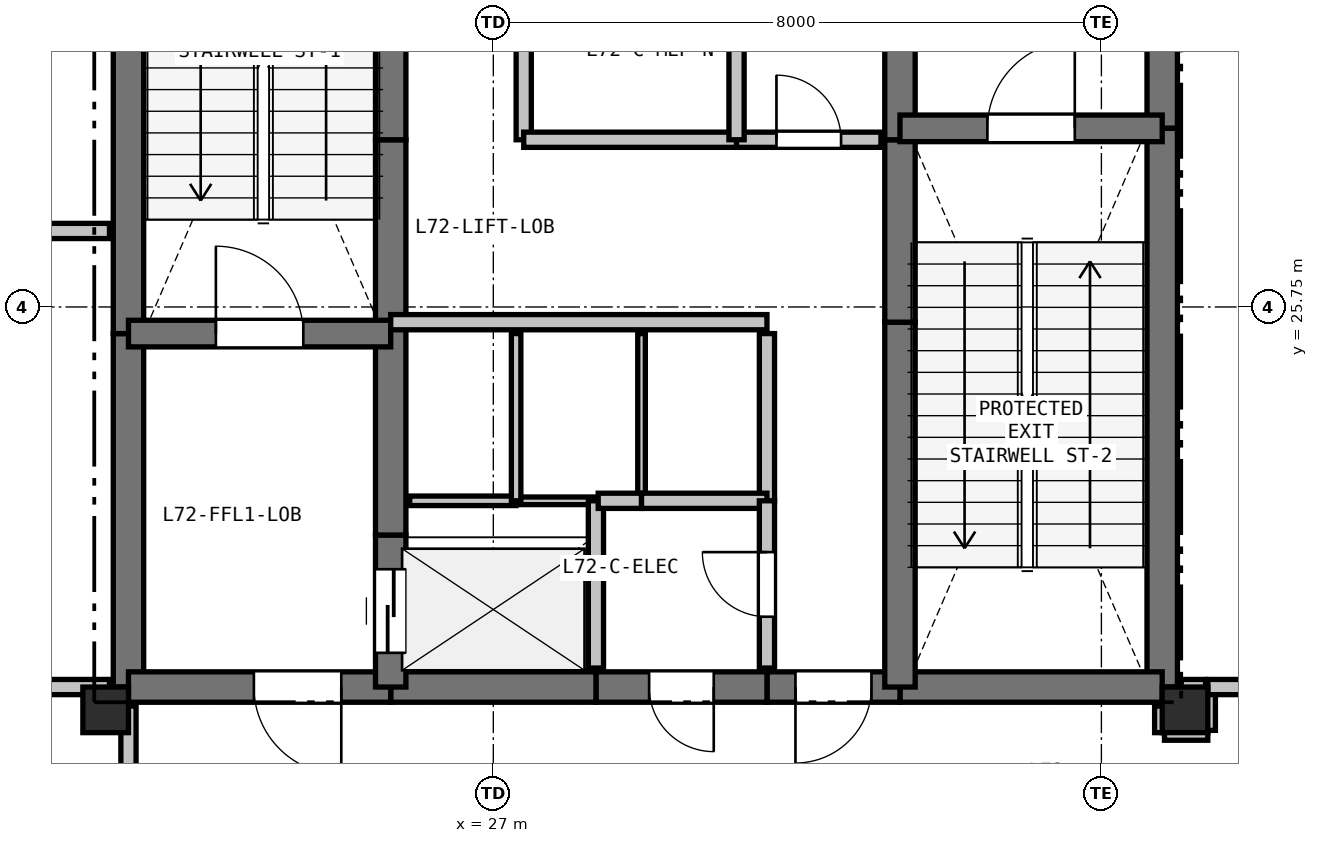
"""IFC4 building model, lengths in metres.
Left out: names, types, materials, properties, quantities, classifications, styles, units other than length and angle.
Written with IfcOpenShell. Run it as: python <this file> out.ifc"""

import sys

from ifc_helpers import new_model, si_unit, direction, frame, frame_2d, origin, origin_2d, place, context, subcontext, project, spatial, rectangle, extrude, element, fill, save


model = new_model("IFC4")
c1 = context("Model", 3, precision=1e-05, world=origin(), true_north=direction((0.0, 1.0)))
c2 = subcontext(c1, "Body", "Model", "MODEL_VIEW")
j1 = project(units=[si_unit("LENGTHUNIT", "METRE"), si_unit("PLANEANGLEUNIT", "RADIAN")], contexts=[c1])
p1 = place(None, origin())
s1 = spatial("IfcSite", under=j1, at=p1, CompositionType="ELEMENT")
p2 = place(p1, origin())
s2 = spatial("IfcBuilding", under=s1, at=p2, CompositionType="ELEMENT")
p3 = place(p2, frame((0.0, 0.0, 258.6)))
s3 = spatial("IfcBuildingStorey", under=s2, at=p3, CompositionType="ELEMENT", Elevation=258.6)
for number, where, z_axis, x_axis in (
    (1, (21.9, 20.45, 0.0), (0.0, 0.0, 1.0), (1.0, 0.0, 0.0)),
    (2, (36.1, 20.45, 0.0), (0.0, 0.0, 1.0), (1.0, 0.0, 0.0)),
):
    element("IfcColumn", number, at=place(p3, frame(where, z_axis=z_axis, x_axis=x_axis)), inside=s3, PredefinedType="COLUMN", context=c2, shape_type="SweptSolid", body=[
        extrude(rectangle(XDim=0.6, YDim=0.6, at=origin_2d()), origin(), (0.0, 0.0, 1.0), 5.4),
    ])
p4 = place(p3, frame((22.2, 20.75, 0.0), z_axis=(0.0, 0.0, 1.0), x_axis=(0.0, 1.0, 0.0)))
e3 = element("IfcWall", 3, at=p4, inside=s3, PredefinedType="SHEAR", context=c2, shape_type="SweptSolid", body=[
    extrude(rectangle(XDim=4.65, YDim=0.4, at=frame_2d((2.325, 0.0))), origin(), (0.0, 0.0, 1.0), 5.08),
])
p5 = place(p3, frame((22.2, 25.4, 0.0), z_axis=(0.0, 0.0, 1.0), x_axis=(0.0, 1.0, 0.0)))
e4 = element("IfcWall", 4, at=p5, inside=s3, PredefinedType="SHEAR", context=c2, shape_type="SweptSolid", body=[
    extrude(rectangle(XDim=7.35, YDim=0.4, at=frame_2d((3.675, 0.0))), origin(), (0.0, 0.0, 1.0), 5.08),
])
p6 = place(p3, frame((35.8, 32.75, 0.0), z_axis=(0.0, 0.0, 1.0), x_axis=(0.0, -1.0, 0.0)))
e5 = element("IfcWall", 5, at=p6, inside=s3, PredefinedType="SHEAR", context=c2, shape_type="SweptSolid", body=[
    extrude(rectangle(XDim=4.65, YDim=0.4, at=frame_2d((2.325, 0.0))), origin(), (0.0, 0.0, 1.0), 5.08),
])
p7 = place(p3, frame((35.8, 28.1, 0.0), z_axis=(0.0, 0.0, 1.0), x_axis=(0.0, -1.0, 0.0)))
e6 = element("IfcWall", 6, at=p7, inside=s3, PredefinedType="SHEAR", context=c2, shape_type="SweptSolid", body=[
    extrude(rectangle(XDim=7.35, YDim=0.4, at=frame_2d((3.675, 0.0))), origin(), (0.0, 0.0, 1.0), 5.08),
])
p8 = place(p3, frame((35.8, 20.75, 0.0), z_axis=(0.0, 0.0, 1.0), x_axis=(-1.0, 0.0, 0.0)))
e7 = element("IfcWall", 7, at=p8, inside=s3, PredefinedType="SHEAR", context=c2, shape_type="SweptSolid", body=[
    extrude(rectangle(XDim=3.45, YDim=0.4, at=frame_2d((1.725, 0.0))), origin(), (0.0, 0.0, 1.0), 5.08),
])
p9 = place(p3, frame((32.35, 20.75, 0.0), z_axis=(0.0, 0.0, 1.0), x_axis=(-1.0, 0.0, 0.0)))
e8 = element("IfcWall", 8, at=p9, inside=s3, PredefinedType="SHEAR", context=c2, shape_type="SweptSolid", body=[
    extrude(rectangle(XDim=1.75, YDim=0.4, at=frame_2d((0.875, 0.0))), origin(), (0.0, 0.0, 1.0), 5.08),
])
p10 = place(p9, frame((0.375, 0.0, 0.0)))
e9 = element("IfcOpeningElement", 9, at=p10, cuts=e8, PredefinedType="OPENING", context=c2, shape_type="SweptSolid", body=[
    extrude(rectangle(XDim=1.0, YDim=2.15, at=frame_2d((0.5, 1.075))), frame((0.0, 0.21, 0.0), z_axis=(0.0, -1.0, 0.0), x_axis=(1.0, 0.0, 0.0)), (0.0, 0.0, 1.0), 0.42),
])
p11 = place(p3, frame((30.6, 20.75, 0.0), z_axis=(0.0, 0.0, 1.0), x_axis=(-1.0, 0.0, 0.0)))
e10 = element("IfcWall", 10, at=p11, inside=s3, PredefinedType="SHEAR", context=c2, shape_type="SweptSolid", body=[
    extrude(rectangle(XDim=2.25, YDim=0.4, at=frame_2d((1.125, 0.0))), origin(), (0.0, 0.0, 1.0), 5.08),
])
p12 = place(p11, frame((0.7, 0.0, 0.0)))
e11 = element("IfcOpeningElement", 11, at=p12, cuts=e10, PredefinedType="OPENING", context=c2, shape_type="SweptSolid", body=[
    extrude(rectangle(XDim=0.85, YDim=2.1, at=frame_2d((0.425, 1.05))), frame((0.0, 0.21, 0.0), z_axis=(0.0, -1.0, 0.0), x_axis=(1.0, 0.0, 0.0)), (0.0, 0.0, 1.0), 0.42),
])
p13 = place(p3, frame((28.35, 20.75, 0.0), z_axis=(0.0, 0.0, 1.0), x_axis=(-1.0, 0.0, 0.0)))
e12 = element("IfcWall", 12, at=p13, inside=s3, PredefinedType="SHEAR", context=c2, shape_type="SweptSolid", body=[
    extrude(rectangle(XDim=2.7, YDim=0.4, at=frame_2d((1.35, 0.0))), origin(), (0.0, 0.0, 1.0), 5.08),
])
p14 = place(p3, frame((25.65, 20.75, 0.0), z_axis=(0.0, 0.0, 1.0), x_axis=(-1.0, 0.0, 0.0)))
e13 = element("IfcWall", 13, at=p14, inside=s3, PredefinedType="SHEAR", context=c2, shape_type="SweptSolid", body=[
    extrude(rectangle(XDim=3.45, YDim=0.4, at=frame_2d((1.725, 0.0))), origin(), (0.0, 0.0, 1.0), 5.08),
])
p15 = place(p14, frame((0.65, 0.0, 0.0)))
e14 = element("IfcOpeningElement", 14, at=p15, cuts=e13, PredefinedType="OPENING", context=c2, shape_type="SweptSolid", body=[
    extrude(rectangle(XDim=1.15, YDim=2.15, at=frame_2d((0.575, 1.075))), frame((0.0, 0.21, 0.0), z_axis=(0.0, -1.0, 0.0), x_axis=(1.0, 0.0, 0.0)), (0.0, 0.0, 1.0), 0.42),
])
p16 = place(p3, frame((25.65, 20.75, 0.0), z_axis=(0.0, 0.0, 1.0), x_axis=(0.0, 1.0, 0.0)))
e15 = element("IfcWall", 15, at=p16, inside=s3, PredefinedType="SHEAR", context=c2, shape_type="SweptSolid", body=[
    extrude(rectangle(XDim=2.0, YDim=0.4, at=frame_2d((1.0, 0.0))), origin(), (0.0, 0.0, 1.0), 5.08),
])
p17 = place(p16, frame((0.45, 0.0, 0.0)))
e16 = element("IfcOpeningElement", 16, at=p17, cuts=e15, PredefinedType="OPENING", context=c2, shape_type="SweptSolid", body=[
    extrude(rectangle(XDim=1.1, YDim=2.15, at=frame_2d((0.55, 1.075))), frame((0.0, 0.21, 0.0), z_axis=(0.0, -1.0, 0.0), x_axis=(1.0, 0.0, 0.0)), (0.0, 0.0, 1.0), 0.42),
])
p18 = place(p3, frame((25.65, 22.75, 0.0), z_axis=(0.0, 0.0, 1.0), x_axis=(0.0, 1.0, 0.0)))
e17 = element("IfcWall", 17, at=p18, inside=s3, PredefinedType="SHEAR", context=c2, shape_type="SweptSolid", body=[
    extrude(rectangle(XDim=2.8, YDim=0.4, at=frame_2d((1.4, 0.0))), origin(), (0.0, 0.0, 1.0), 5.08),
])
p19 = place(p3, frame((25.65, 25.55, 0.0), z_axis=(0.0, 0.0, 1.0), x_axis=(0.0, 1.0, 0.0)))
e18 = element("IfcWall", 18, at=p19, inside=s3, PredefinedType="SHEAR", context=c2, shape_type="SweptSolid", body=[
    extrude(rectangle(XDim=2.4, YDim=0.4, at=frame_2d((1.2, 0.0))), origin(), (0.0, 0.0, 1.0), 5.08),
])
for number, where, z_axis, x_axis in (
    (19, (25.65, 27.95, 0.0), (0.0, 0.0, 1.0), (0.0, 1.0, 0.0)),
    (20, (32.35, 20.75, 0.0), (0.0, 0.0, 1.0), (0.0, 1.0, 0.0)),
):
    element("IfcWall", number, at=place(p3, frame(where, z_axis=z_axis, x_axis=x_axis)), inside=s3, PredefinedType="SHEAR", context=c2, shape_type="SweptSolid", body=[
        extrude(rectangle(XDim=4.8, YDim=0.4, at=frame_2d((2.4, 0.0))), origin(), (0.0, 0.0, 1.0), 5.08),
    ])
p20 = place(p3, frame((32.35, 25.55, 0.0), z_axis=(0.0, 0.0, 1.0), x_axis=(0.0, 1.0, 0.0)))
e21 = element("IfcWall", 21, at=p20, inside=s3, PredefinedType="SHEAR", context=c2, shape_type="SweptSolid", body=[
    extrude(rectangle(XDim=2.4, YDim=0.4, at=frame_2d((1.2, 0.0))), origin(), (0.0, 0.0, 1.0), 5.08),
])
p21 = place(p3, frame((32.35, 27.95, 0.0), z_axis=(0.0, 0.0, 1.0), x_axis=(0.0, 1.0, 0.0)))
e22 = element("IfcWall", 22, at=p21, inside=s3, PredefinedType="SHEAR", context=c2, shape_type="SweptSolid", body=[
    extrude(rectangle(XDim=2.8, YDim=0.4, at=frame_2d((1.4, 0.0))), origin(), (0.0, 0.0, 1.0), 5.08),
])
p22 = place(p3, frame((22.2, 25.4, 0.0), z_axis=(0.0, 0.0, 1.0), x_axis=(1.0, 0.0, 0.0)))
e23 = element("IfcWall", 23, at=p22, inside=s3, PredefinedType="SHEAR", context=c2, shape_type="SweptSolid", body=[
    extrude(rectangle(XDim=3.45, YDim=0.35, at=frame_2d((1.725, 0.0))), origin(), (0.0, 0.0, 1.0), 5.08),
])
p23 = place(p22, frame((1.15, 0.0, 0.0)))
e24 = element("IfcOpeningElement", 24, at=p23, cuts=e23, PredefinedType="OPENING", context=c2, shape_type="SweptSolid", body=[
    extrude(rectangle(XDim=1.15, YDim=2.15, at=frame_2d((0.575, 1.075))), frame((0.0, 0.185, 0.0), z_axis=(0.0, -1.0, 0.0), x_axis=(1.0, 0.0, 0.0)), (0.0, 0.0, 1.0), 0.37),
])
p24 = place(p3, frame((32.35, 28.1, 0.0), z_axis=(0.0, 0.0, 1.0), x_axis=(1.0, 0.0, 0.0)))
e25 = element("IfcWall", 25, at=p24, inside=s3, PredefinedType="SHEAR", context=c2, shape_type="SweptSolid", body=[
    extrude(rectangle(XDim=3.45, YDim=0.35, at=frame_2d((1.725, 0.0))), origin(), (0.0, 0.0, 1.0), 5.08),
])
p25 = place(p24, frame((1.15, 0.0, 0.0)))
e26 = element("IfcOpeningElement", 26, at=p25, cuts=e25, PredefinedType="OPENING", context=c2, shape_type="SweptSolid", body=[
    extrude(rectangle(XDim=1.15, YDim=2.15, at=frame_2d((0.575, 1.075))), frame((0.0, 0.185, 0.0), z_axis=(0.0, -1.0, 0.0), x_axis=(1.0, 0.0, 0.0)), (0.0, 0.0, 1.0), 0.37),
])
p26 = place(p3, frame((25.65, 25.55, 0.0), z_axis=(0.0, 0.0, 1.0), x_axis=(1.0, 0.0, 0.0)))
e27 = element("IfcWall", 27, at=p26, inside=s3, PredefinedType="PARTITIONING", context=c2, shape_type="SweptSolid", body=[
    extrude(rectangle(XDim=4.95, YDim=0.2, at=frame_2d((2.475, 0.0))), origin(), (0.0, 0.0, 1.0), 5.08),
])
p27 = place(p3, frame((25.9, 23.2, 0.0), z_axis=(0.0, 0.0, 1.0), x_axis=(1.0, 0.0, 0.0)))
e28 = element("IfcWall", 28, at=p27, inside=s3, PredefinedType="PARTITIONING", context=c2, shape_type="SweptSolid", body=[
    extrude(rectangle(XDim=1.4, YDim=0.125, at=frame_2d((0.7, 0.0))), origin(), (0.0, 0.0, 1.0), 5.08),
])
p28 = place(p3, frame((27.3, 23.2, 0.0), z_axis=(0.0, 0.0, 1.0), x_axis=(1.0, 0.0, 0.0)))
e29 = element("IfcWall", 29, at=p28, inside=s3, PredefinedType="PARTITIONING", context=c2, shape_type="SweptSolid", body=[
    extrude(rectangle(XDim=1.05, YDim=0.1, at=frame_2d((0.525, 0.0))), origin(), (0.0, 0.0, 1.0), 5.08),
])
p29 = place(p3, frame((28.35, 23.2, 0.0), z_axis=(0.0, 0.0, 1.0), x_axis=(0.0, -1.0, 0.0)))
e30 = element("IfcWall", 30, at=p29, inside=s3, PredefinedType="PARTITIONING", context=c2, shape_type="SweptSolid", body=[
    extrude(rectangle(XDim=2.2, YDim=0.2, at=frame_2d((1.1, 0.0))), origin(), (0.0, 0.0, 1.0), 5.08),
])
p30 = place(p3, frame((27.3, 25.4, 0.0), z_axis=(0.0, 0.0, 1.0), x_axis=(0.0, -1.0, 0.0)))
e31 = element("IfcWall", 31, at=p30, inside=s3, PredefinedType="PARTITIONING", context=c2, shape_type="SweptSolid", body=[
    extrude(rectangle(XDim=2.2, YDim=0.125, at=frame_2d((1.1, 0.0))), origin(), (0.0, 0.0, 1.0), 5.08),
])
p31 = place(p3, frame((28.95, 25.4, 0.0), z_axis=(0.0, 0.0, 1.0), x_axis=(0.0, -1.0, 0.0)))
e32 = element("IfcWall", 32, at=p31, inside=s3, PredefinedType="PARTITIONING", context=c2, shape_type="SweptSolid", body=[
    extrude(rectangle(XDim=2.2, YDim=0.1, at=frame_2d((1.1, 0.0))), origin(), (0.0, 0.0, 1.0), 5.08),
])
p32 = place(p3, frame((28.95, 23.2, 0.0), z_axis=(0.0, 0.0, 1.0), x_axis=(-1.0, 0.0, 0.0)))
e33 = element("IfcWall", 33, at=p32, inside=s3, PredefinedType="PARTITIONING", context=c2, shape_type="SweptSolid", body=[
    extrude(rectangle(XDim=0.57, YDim=0.2, at=frame_2d((0.285, 0.0))), origin(), (0.0, 0.0, 1.0), 5.08),
])
p33 = place(p3, frame((30.6, 25.4, 0.0), z_axis=(0.0, 0.0, 1.0), x_axis=(0.0, -1.0, 0.0)))
e34 = element("IfcWall", 34, at=p33, inside=s3, PredefinedType="PARTITIONING", context=c2, shape_type="SweptSolid", body=[
    extrude(rectangle(XDim=2.2, YDim=0.2, at=frame_2d((1.1, 0.0))), origin(), (0.0, 0.0, 1.0), 5.08),
])
p34 = place(p3, frame((30.6, 23.2, 0.0), z_axis=(0.0, 0.0, 1.0), x_axis=(-1.0, 0.0, 0.0)))
e35 = element("IfcWall", 35, at=p34, inside=s3, PredefinedType="PARTITIONING", context=c2, shape_type="SweptSolid", body=[
    extrude(rectangle(XDim=1.65, YDim=0.2, at=frame_2d((0.825, 0.0))), origin(), (0.0, 0.0, 1.0), 5.08),
])
p35 = place(p3, frame((30.6, 21.0, 0.0), z_axis=(0.0, 0.0, 1.0), x_axis=(0.0, 1.0, 0.0)))
e36 = element("IfcWall", 36, at=p35, inside=s3, PredefinedType="PARTITIONING", context=c2, shape_type="SweptSolid", body=[
    extrude(rectangle(XDim=2.2, YDim=0.2, at=frame_2d((1.1, 0.0))), origin(), (0.0, 0.0, 1.0), 5.08),
])
p36 = place(p35, frame((0.675, 0.0, 0.0)))
e37 = element("IfcOpeningElement", 37, at=p36, cuts=e36, PredefinedType="OPENING", context=c2, shape_type="SweptSolid", body=[
    extrude(rectangle(XDim=0.85, YDim=2.1, at=frame_2d((0.425, 1.05))), frame((0.0, 0.11, 0.0), z_axis=(0.0, -1.0, 0.0), x_axis=(1.0, 0.0, 0.0)), (0.0, 0.0, 1.0), 0.22),
])
p37 = place(p3, frame((27.4, 32.5, 0.0), z_axis=(0.0, 0.0, 1.0), x_axis=(0.0, -1.0, 0.0)))
e38 = element("IfcWall", 38, at=p37, inside=s3, PredefinedType="PARTITIONING", context=c2, shape_type="SweptSolid", body=[
    extrude(rectangle(XDim=4.55, YDim=0.2, at=frame_2d((2.275, 0.0))), origin(), (0.0, 0.0, 1.0), 5.08),
])
p38 = place(p37, frame((1.85, 0.0, 0.0)))
e39 = element("IfcOpeningElement", 39, at=p38, cuts=e38, PredefinedType="OPENING", context=c2, shape_type="SweptSolid", body=[
    extrude(rectangle(XDim=0.85, YDim=2.1, at=frame_2d((0.425, 1.05))), frame((0.0, 0.11, 0.0), z_axis=(0.0, -1.0, 0.0), x_axis=(1.0, 0.0, 0.0)), (0.0, 0.0, 1.0), 0.22),
])
p39 = place(p3, frame((27.4, 27.95, 0.0), z_axis=(0.0, 0.0, 1.0), x_axis=(1.0, 0.0, 0.0)))
e40 = element("IfcWall", 40, at=p39, inside=s3, PredefinedType="PARTITIONING", context=c2, shape_type="SweptSolid", body=[
    extrude(rectangle(XDim=2.8, YDim=0.2, at=frame_2d((1.4, 0.0))), origin(), (0.0, 0.0, 1.0), 5.08),
])
p40 = place(p3, frame((30.2, 27.95, 0.0), z_axis=(0.0, 0.0, 1.0), x_axis=(1.0, 0.0, 0.0)))
e41 = element("IfcWall", 41, at=p40, inside=s3, PredefinedType="PARTITIONING", context=c2, shape_type="SweptSolid", body=[
    extrude(rectangle(XDim=1.9, YDim=0.2, at=frame_2d((0.95, 0.0))), origin(), (0.0, 0.0, 1.0), 5.08),
])
p41 = place(p40, frame((0.525, 0.0, 0.0)))
e42 = element("IfcOpeningElement", 42, at=p41, cuts=e41, PredefinedType="OPENING", context=c2, shape_type="SweptSolid", body=[
    extrude(rectangle(XDim=0.85, YDim=2.1, at=frame_2d((0.425, 1.05))), frame((0.0, 0.11, 0.0), z_axis=(0.0, -1.0, 0.0), x_axis=(1.0, 0.0, 0.0)), (0.0, 0.0, 1.0), 0.22),
])
p42 = place(p3, frame((35.8, 20.5, 0.0), z_axis=(0.0, 0.0, 1.0), x_axis=(0.0, -1.0, 0.0)))
e43 = element("IfcWall", 43, at=p42, inside=s3, PredefinedType="PARTITIONING", context=c2, shape_type="SweptSolid", body=[
    extrude(rectangle(XDim=0.35, YDim=0.2, at=frame_2d((0.175, 0.0))), origin(), (0.0, 0.0, 1.0), 4.605),
])
p43 = place(p3, frame((35.83, 20.15, 0.0), z_axis=(0.0, 0.0, 1.0), x_axis=(1.0, 0.0, 0.0)))
e44 = element("IfcWall", 44, at=p43, inside=s3, PredefinedType="PARTITIONING", context=c2, shape_type="SweptSolid", body=[
    extrude(rectangle(XDim=0.57, YDim=0.2, at=frame_2d((0.285, 0.0))), origin(), (0.0, 0.0, 1.0), 4.528),
])
p44 = place(p3, frame((36.4, 20.18, 0.0), z_axis=(0.0, 0.0, 1.0), x_axis=(0.0, 1.0, 0.0)))
e45 = element("IfcWall", 45, at=p44, inside=s3, PredefinedType="PARTITIONING", context=c2, shape_type="SweptSolid", body=[
    extrude(rectangle(XDim=0.57, YDim=0.2, at=frame_2d((0.285, 0.0))), origin(), (0.0, 0.0, 1.0), 5.08),
])
p45 = place(p3, frame((36.4, 20.75, 0.0), z_axis=(0.0, 0.0, 1.0), x_axis=(1.0, 0.0, 0.0)))
e46 = element("IfcWall", 46, at=p45, inside=s3, PredefinedType="PARTITIONING", context=c2, shape_type="SweptSolid", body=[
    extrude(rectangle(XDim=1.45, YDim=0.2, at=frame_2d((0.725, 0.0))), origin(), (0.0, 0.0, 1.0), 5.08),
])
p46 = place(p3, frame((22.2, 18.329, 0.0), z_axis=(0.0, 0.0, 1.0), x_axis=(0.0, 1.0, 0.0)))
e47 = element("IfcWall", 47, at=p46, inside=s3, PredefinedType="PARTITIONING", context=c2, shape_type="SweptSolid", body=[
    extrude(rectangle(XDim=2.171, YDim=0.2, at=frame_2d((1.085, 0.0))), origin(), (0.0, 0.0, 1.0), 4.528),
])
p47 = place(p3, frame((30.2, 30.3, 0.0), z_axis=(0.0, 0.0, 1.0), x_axis=(0.0, -1.0, 0.0)))
e48 = element("IfcWall", 48, at=p47, inside=s3, PredefinedType="PARTITIONING", context=c2, shape_type="SweptSolid", body=[
    extrude(rectangle(XDim=2.35, YDim=0.2, at=frame_2d((1.175, 0.0))), origin(), (0.0, 0.0, 1.0), 5.08),
])
p48 = place(p3, frame((21.95, 26.75, 0.0), z_axis=(0.0, 0.0, 1.0), x_axis=(-1.0, 0.0, 0.0)))
e49 = element("IfcWall", 49, at=p48, inside=s3, PredefinedType="PARTITIONING", context=c2, shape_type="SweptSolid", body=[
    extrude(rectangle(XDim=11.082, YDim=0.2, at=frame_2d((5.541, 0.0))), origin(), (0.0, 0.0, 1.0), 4.605),
])
p49 = place(p48, frame((5.116, 0.0, 0.0)))
e50 = element("IfcOpeningElement", 50, at=p49, cuts=e49, PredefinedType="OPENING", context=c2, shape_type="SweptSolid", body=[
    extrude(rectangle(XDim=0.85, YDim=2.1, at=frame_2d((0.425, 1.05))), frame((0.0, 0.11, 0.0), z_axis=(0.0, -1.0, 0.0), x_axis=(1.0, 0.0, 0.0)), (0.0, 0.0, 1.0), 0.22),
])
p50 = place(p3, frame((21.95, 20.75, 0.0), z_axis=(0.0, 0.0, 1.0), x_axis=(-1.0, 0.0, 0.0)))
e51 = element("IfcWall", 51, at=p50, inside=s3, PredefinedType="PARTITIONING", context=c2, shape_type="SweptSolid", body=[
    extrude(rectangle(XDim=1.45, YDim=0.2, at=frame_2d((0.725, 0.0))), origin(), (0.0, 0.0, 1.0), 4.528),
])
p51 = place(p3, frame((36.37, 20.75, 0.0), z_axis=(0.0, 0.0, 1.0), x_axis=(-1.0, 0.0, 0.0)))
e52 = element("IfcWall", 52, at=p51, inside=s3, PredefinedType="PARTITIONING", context=c2, shape_type="SweptSolid", body=[
    extrude(rectangle(XDim=0.32, YDim=0.2, at=frame_2d((0.16, 0.0))), origin(), (0.0, 0.0, 1.0), 4.605),
])
p52 = place(p10, origin())
e53 = element("IfcDoor", 53, at=p52, inside=s3, OperationType="SINGLE_SWING_RIGHT", PredefinedType="DOOR", context=c2, shape_type="SweptSolid", body=[
    extrude(rectangle(XDim=1.0, YDim=2.15, at=frame_2d((0.5, 1.075))), frame((0.0, 0.025, 0.0), z_axis=(0.0, -1.0, 0.0), x_axis=(1.0, 0.0, 0.0)), (0.0, 0.0, 1.0), 0.05),
])
fill(e9, e53)
p53 = place(p17, origin())
e54 = element("IfcDoor", 54, at=p53, inside=s3, OperationType="SLIDING_TO_LEFT", PredefinedType="DOOR", context=c2, shape_type="SweptSolid", body=[
    extrude(rectangle(XDim=1.1, YDim=2.15, at=frame_2d((0.55, 1.075))), frame((0.0, 0.025, 0.0), z_axis=(0.0, -1.0, 0.0), x_axis=(1.0, 0.0, 0.0)), (0.0, 0.0, 1.0), 0.05),
])
fill(e16, e54)
p54 = place(p23, origin())
e55 = element("IfcDoor", 55, at=p54, inside=s3, OperationType="SINGLE_SWING_LEFT", PredefinedType="DOOR", context=c2, shape_type="SweptSolid", body=[
    extrude(rectangle(XDim=1.15, YDim=2.15, at=frame_2d((0.575, 1.075))), frame((0.0, 0.025, 0.0), z_axis=(0.0, -1.0, 0.0), x_axis=(1.0, 0.0, 0.0)), (0.0, 0.0, 1.0), 0.05),
])
fill(e24, e55)
p55 = place(p25, origin())
e56 = element("IfcDoor", 56, at=p55, inside=s3, OperationType="SINGLE_SWING_RIGHT", PredefinedType="DOOR", context=c2, shape_type="SweptSolid", body=[
    extrude(rectangle(XDim=1.15, YDim=2.15, at=frame_2d((0.575, 1.075))), frame((0.0, 0.025, 0.0), z_axis=(0.0, -1.0, 0.0), x_axis=(1.0, 0.0, 0.0)), (0.0, 0.0, 1.0), 0.05),
])
fill(e26, e56)
p56 = place(p15, origin())
e57 = element("IfcDoor", 57, at=p56, inside=s3, OperationType="SINGLE_SWING_LEFT", PredefinedType="DOOR", context=c2, shape_type="SweptSolid", body=[
    extrude(rectangle(XDim=1.15, YDim=2.15, at=frame_2d((0.575, 1.075))), frame((0.0, 0.025, 0.0), z_axis=(0.0, -1.0, 0.0), x_axis=(1.0, 0.0, 0.0)), (0.0, 0.0, 1.0), 0.05),
])
fill(e14, e57)
p57 = place(p41, origin())
e58 = element("IfcDoor", 58, at=p57, inside=s3, OperationType="SINGLE_SWING_LEFT", PredefinedType="DOOR", context=c2, shape_type="SweptSolid", body=[
    extrude(rectangle(XDim=0.85, YDim=2.1, at=frame_2d((0.425, 1.05))), frame((0.0, 0.025, 0.0), z_axis=(0.0, -1.0, 0.0), x_axis=(1.0, 0.0, 0.0)), (0.0, 0.0, 1.0), 0.05),
])
fill(e42, e58)
p58 = place(p36, origin())
e59 = element("IfcDoor", 59, at=p58, inside=s3, OperationType="SINGLE_SWING_RIGHT", PredefinedType="DOOR", context=c2, shape_type="SweptSolid", body=[
    extrude(rectangle(XDim=0.85, YDim=2.1, at=frame_2d((0.425, 1.05))), frame((0.0, 0.025, 0.0), z_axis=(0.0, -1.0, 0.0), x_axis=(1.0, 0.0, 0.0)), (0.0, 0.0, 1.0), 0.05),
])
fill(e37, e59)
p59 = place(p12, origin())
e60 = element("IfcDoor", 60, at=p59, inside=s3, OperationType="SINGLE_SWING_LEFT", PredefinedType="DOOR", context=c2, shape_type="SweptSolid", body=[
    extrude(rectangle(XDim=0.85, YDim=2.1, at=frame_2d((0.425, 1.05))), frame((0.0, 0.025, 0.0), z_axis=(0.0, -1.0, 0.0), x_axis=(1.0, 0.0, 0.0)), (0.0, 0.0, 1.0), 0.05),
])
fill(e11, e60)
save(model, sys.argv[1])
